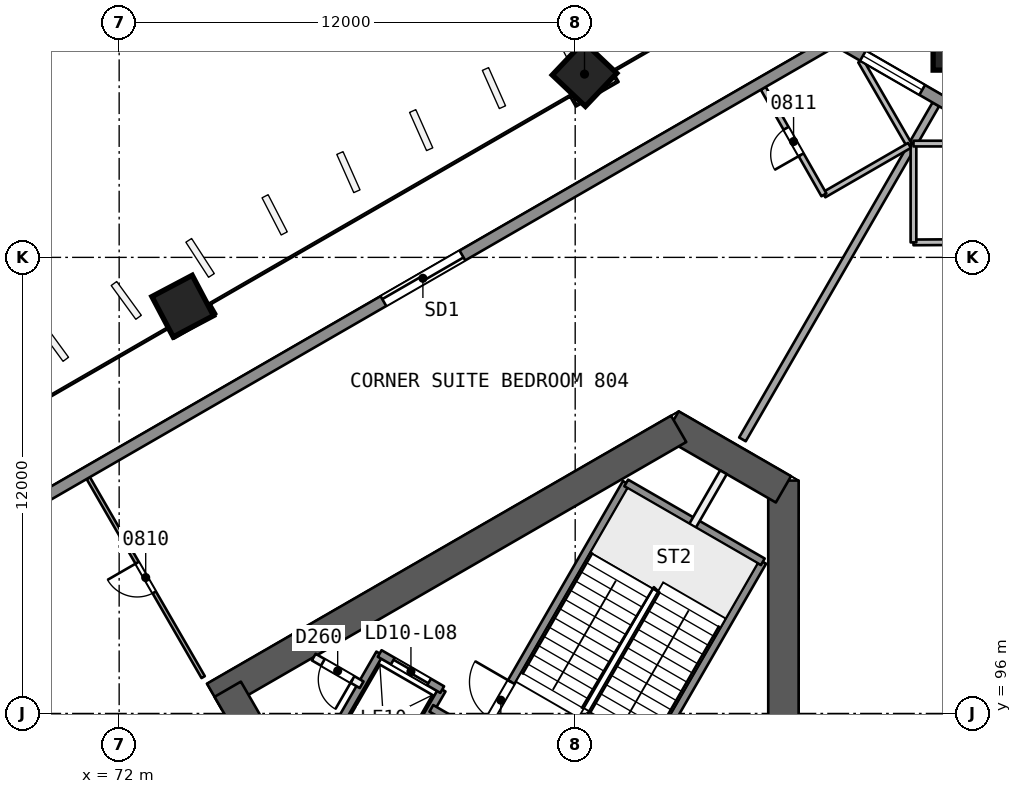
"""IFC4 building model, lengths in metres.
Left out: names, types, materials, properties, quantities, classifications, styles, units other than length and angle.
Written with IfcOpenShell. Run it as: python <this file> out.ifc"""

import sys

from ifc_helpers import new_model, si_unit, direction, frame, frame_2d, origin, origin_2d, place, context, subcontext, project, spatial, rectangle, extrude, element, fill, save


model = new_model("IFC4")
c1 = context("Model", 3, precision=1e-05, world=origin(), true_north=direction((0.0, 1.0)))
c2 = subcontext(c1, "Body", "Model", "MODEL_VIEW")
j1 = project(units=[si_unit("LENGTHUNIT", "METRE"), si_unit("PLANEANGLEUNIT", "RADIAN")], contexts=[c1])
p1 = place(None, origin())
s1 = spatial("IfcSite", under=j1, at=p1, CompositionType="ELEMENT")
p2 = place(p1, origin())
s2 = spatial("IfcBuilding", under=s1, at=p2, CompositionType="ELEMENT")
p3 = place(p2, frame((0.0, 0.0, 41.1)))
s3 = spatial("IfcBuildingStorey", under=s2, at=p3, CompositionType="ELEMENT", Elevation=41.1)
p4 = place(p3, frame((89.48, 88.194, 0.0), z_axis=(0.0, 0.0, 1.0), x_axis=(0.0, 1.0, 0.0)))
e1 = element("IfcWall", 1, at=p4, inside=s3, PredefinedType="SHEAR", context=c2, shape_type="SweptSolid", body=[
    extrude(rectangle(XDim=13.933, YDim=0.8, at=frame_2d((6.967, 0.0))), origin(), (0.0, 0.0, 1.0), 3.7),
])
p5 = place(p3, frame((89.48, 101.897, 0.0), z_axis=(0.0, 0.0, 1.0), x_axis=(-0.866034355626, 0.499984494636, 0.0)))
e2 = element("IfcWall", 2, at=p5, inside=s3, PredefinedType="SHEAR", context=c2, shape_type="SweptSolid", body=[
    extrude(rectangle(XDim=3.414, YDim=0.8, at=frame_2d((1.707, 0.0))), origin(), (0.0, 0.0, 1.0), 3.7),
])
p6 = place(p3, frame((86.723, 103.488, 0.0), z_axis=(0.0, 0.0, 1.0), x_axis=(-0.866032504327, -0.499987701298, 0.0)))
e3 = element("IfcWall", 3, at=p6, inside=s3, PredefinedType="SHEAR", context=c2, shape_type="SweptSolid", body=[
    extrude(rectangle(XDim=14.102, YDim=0.8, at=frame_2d((7.051, 0.0))), origin(), (0.0, 0.0, 1.0), 3.7),
])
p7 = place(p3, frame((74.856, 96.637, 0.0), z_axis=(0.0, 0.0, 1.0), x_axis=(0.499993500917, -0.866029155999, 0.0)))
e4 = element("IfcWall", 4, at=p7, inside=s3, PredefinedType="SHEAR", context=c2, shape_type="SweptSolid", body=[
    extrude(rectangle(XDim=9.98, YDim=0.8, at=frame_2d((4.99, 0.0))), origin(), (0.0, 0.0, 1.0), 3.7),
])
p8 = place(p7, frame((7.83, 0.0, 0.0)))
e5 = element("IfcOpeningElement", 5, at=p8, cuts=e4, PredefinedType="OPENING", context=c2, shape_type="SweptSolid", body=[
    extrude(rectangle(XDim=1.2, YDim=2.1, at=frame_2d((0.6, 1.05))), frame((0.0, 0.411, 0.0), z_axis=(0.0, -1.0, 0.0), x_axis=(1.0, 0.0, 0.0)), (0.0, 0.0, 1.0), 0.821),
])
p9 = place(p3, frame((94.84, 114.364, 0.0), z_axis=(-0.017607037296, -0.030466109479, 0.999380712447), x_axis=(0.86581098392, -0.500371202332, 2.457e-09)))
e6 = element("IfcColumn", 6, at=p9, inside=s3, PredefinedType="COLUMN", context=c2, shape_type="SweptSolid", body=[
    extrude(rectangle(XDim=2.8, YDim=2.8, at=origin_2d()), origin(), (0.0, 0.0, 1.0), 3.702),
])
p10 = place(p3, frame((84.256, 112.855, 0.0), z_axis=(-0.00837646992, -0.028097450282, 0.999570091609), x_axis=(0.86617163682, 0.499292783589, 0.021293469065)))
e7 = element("IfcColumn", 7, at=p10, inside=s3, PredefinedType="COLUMN", context=c2, shape_type="SweptSolid", body=[
    extrude(rectangle(XDim=1.2, YDim=1.2, at=origin_2d()), origin(), (0.0, 0.0, 1.0), 3.702),
])
p11 = place(p3, frame((73.671, 106.745, 0.0), z_axis=(0.000857578916, -0.022824792675, 0.999739112668), x_axis=(0.866060219769, 0.499825848733, 0.01066848966)))
e8 = element("IfcColumn", 8, at=p11, inside=s3, PredefinedType="COLUMN", context=c2, shape_type="SweptSolid", body=[
    extrude(rectangle(XDim=1.2, YDim=1.2, at=origin_2d()), origin(), (0.0, 0.0, 1.0), 3.701),
])
p12 = place(p3, frame((96.127, 108.413, 0.0), z_axis=(0.0, 0.0, 1.0), x_axis=(-0.999982570839, -0.005904067862, 0.0)))
e9 = element("IfcWall", 9, at=p12, inside=s3, PredefinedType="PARTITIONING", context=c2, shape_type="SweptSolid", body=[
    extrude(rectangle(XDim=3.225, YDim=0.15, at=frame_2d((1.613, 0.0))), origin(), (0.0, 0.0, 1.0), 3.2),
])
p13 = place(p12, frame((1.213, 0.0, 0.0)))
e10 = element("IfcOpeningElement", 10, at=p13, cuts=e9, PredefinedType="OPENING", context=c2, shape_type="SweptSolid", body=[
    extrude(rectangle(XDim=0.8, YDim=2.1, at=frame_2d((0.4, 1.05))), frame((0.0, 0.085, 0.0), z_axis=(0.0, -1.0, 0.0), x_axis=(1.0, 0.0, 0.0)), (0.0, 0.0, 1.0), 0.171),
])
p14 = place(p3, frame((92.902, 108.394, 0.0), z_axis=(0.0, 0.0, 1.0), x_axis=(0.0, 1.0, 0.0)))
e11 = element("IfcWall", 11, at=p14, inside=s3, PredefinedType="PARTITIONING", context=c2, shape_type="SweptSolid", body=[
    extrude(rectangle(XDim=2.6, YDim=0.15, at=frame_2d((1.3, 0.0))), origin(), (0.0, 0.0, 1.0), 3.2),
])
p15 = place(p3, frame((92.902, 110.994, 0.0), z_axis=(0.0, 0.0, 1.0), x_axis=(1.0, 0.0, 0.0)))
e12 = element("IfcWall", 12, at=p15, inside=s3, PredefinedType="PARTITIONING", context=c2, shape_type="SweptSolid", body=[
    extrude(rectangle(XDim=2.376, YDim=0.15, at=frame_2d((1.188, 0.0))), origin(), (0.0, 0.0, 1.0), 3.2),
])
p16 = place(p3, frame((93.49, 112.026, 0.0), z_axis=(0.0, 0.0, 1.0), x_axis=(-0.499993053251, -0.866029414455, 0.0)))
e13 = element("IfcWall", 13, at=p16, inside=s3, PredefinedType="PARTITIONING", context=c2, shape_type="SweptSolid", body=[
    extrude(rectangle(XDim=10.179, YDim=0.2, at=frame_2d((5.089, 0.0))), origin(), (0.0, 0.0, 1.0), 3.2),
])
p17 = place(p3, frame((74.21, 96.956, 0.0), z_axis=(0.0, 0.0, 1.0), x_axis=(-0.499985689571, 0.866033665757, 0.0)))
e14 = element("IfcWall", 14, at=p17, inside=s3, PredefinedType="PARTITIONING", context=c2, shape_type="SweptSolid", body=[
    extrude(rectangle(XDim=6.048, YDim=0.1, at=frame_2d((3.024, 0.0))), origin(), (0.0, 0.0, 1.0), 3.2),
])
p18 = place(p17, frame((2.574, 0.0, 0.0)))
e15 = element("IfcOpeningElement", 15, at=p18, cuts=e14, PredefinedType="OPENING", context=c2, shape_type="SweptSolid", body=[
    extrude(rectangle(XDim=0.9, YDim=2.1, at=frame_2d((0.45, 1.05))), frame((0.0, 0.061, 0.0), z_axis=(0.0, -1.0, 0.0), x_axis=(1.0, 0.0, 0.0)), (0.0, 0.0, 1.0), 0.121),
])
p19 = place(p3, frame((67.136, 99.855, 0.0), z_axis=(0.0, 0.0, 1.0), x_axis=(0.499997162821, -0.866027041824, 0.0)))
e16 = element("IfcWall", 16, at=p19, inside=s3, PredefinedType="PARTITIONING", context=c2, shape_type="SweptSolid", body=[
    extrude(rectangle(XDim=14.027, YDim=0.2, at=frame_2d((7.013, 0.0))), origin(), (0.0, 0.0, 1.0), 3.2),
])
p20 = place(p3, frame((91.514, 113.167, 0.0), z_axis=(0.0, 0.0, 1.0), x_axis=(0.499936653632, -0.866061973738, 0.0)))
e17 = element("IfcWall", 17, at=p20, inside=s3, PredefinedType="PARTITIONING", context=c2, shape_type="SweptSolid", body=[
    extrude(rectangle(XDim=2.565, YDim=0.15, at=frame_2d((1.283, 0.0))), origin(), (0.0, 0.0, 1.0), 3.2),
])
p21 = place(p3, frame((92.797, 110.946, 0.0), z_axis=(0.0, 0.0, 1.0), x_axis=(-0.866021400173, -0.500006934395, 0.0)))
e18 = element("IfcWall", 18, at=p21, inside=s3, PredefinedType="PARTITIONING", context=c2, shape_type="SweptSolid", body=[
    extrude(rectangle(XDim=2.6, YDim=0.15, at=frame_2d((1.3, 0.0))), origin(), (0.0, 0.0, 1.0), 3.2),
])
p22 = place(p3, frame((90.545, 109.646, 0.0), z_axis=(0.0, 0.0, 1.0), x_axis=(-0.494883074799, 0.868959574593, 0.0)))
e19 = element("IfcWall", 19, at=p22, inside=s3, PredefinedType="PARTITIONING", context=c2, shape_type="SweptSolid", body=[
    extrude(rectangle(XDim=3.225, YDim=0.15, at=frame_2d((1.613, 0.0))), origin(), (0.0, 0.0, 1.0), 3.2),
])
p23 = place(p22, frame((1.213, 0.0, 0.0)))
e20 = element("IfcOpeningElement", 20, at=p23, cuts=e19, PredefinedType="OPENING", context=c2, shape_type="SweptSolid", body=[
    extrude(rectangle(XDim=0.8, YDim=2.1, at=frame_2d((0.4, 1.05))), frame((0.0, 0.085, 0.0), z_axis=(0.0, -1.0, 0.0), x_axis=(1.0, 0.0, 0.0)), (0.0, 0.0, 1.0), 0.171),
])
p24 = place(p3, frame((90.854, 113.72, 0.0), z_axis=(0.0, 0.0, 1.0), x_axis=(0.866021938441, -0.500006002103, 0.0)))
e21 = element("IfcWall", 21, at=p24, inside=s3, PredefinedType="SOLIDWALL", context=c2, shape_type="SweptSolid", body=[
    extrude(rectangle(XDim=6.261, YDim=0.3, at=frame_2d((3.13, 0.0))), origin(), (0.0, 0.0, 1.0), 3.2),
])
p25 = place(p24, frame((3.522, 0.0, 0.9)))
e22 = element("IfcOpeningElement", 22, at=p25, cuts=e21, PredefinedType="OPENING", context=c2, shape_type="SweptSolid", body=[
    extrude(rectangle(XDim=1.8, YDim=1.5, at=frame_2d((0.9, 0.75))), frame((0.0, 0.161, 0.0), z_axis=(0.0, -1.0, 0.0), x_axis=(1.0, 0.0, 0.0)), (0.0, 0.0, 1.0), 0.321),
])
p26 = place(p24, frame((0.83, 0.0, 0.9)))
e23 = element("IfcOpeningElement", 23, at=p26, cuts=e21, PredefinedType="OPENING", context=c2, shape_type="SweptSolid", body=[
    extrude(rectangle(XDim=1.8, YDim=1.5, at=frame_2d((0.9, 0.75))), frame((0.0, 0.161, 0.0), z_axis=(0.0, -1.0, 0.0), x_axis=(1.0, 0.0, 0.0)), (0.0, 0.0, 1.0), 0.321),
])
p27 = place(p3, frame((37.87, 83.13, 0.0), z_axis=(0.0, 0.0, 1.0), x_axis=(0.866026630825, 0.499997874697, 0.0)))
e24 = element("IfcWall", 24, at=p27, inside=s3, PredefinedType="SOLIDWALL", context=c2, shape_type="SweptSolid", body=[
    extrude(rectangle(XDim=61.18, YDim=0.3, at=frame_2d((30.59, 0.0))), origin(), (0.0, 0.0, 1.0), 3.2),
])
p28 = place(p27, frame((12.181, 0.0, 0.0)))
e25 = element("IfcOpeningElement", 25, at=p28, cuts=e24, PredefinedType="OPENING", context=c2, shape_type="SweptSolid", body=[
    extrude(rectangle(XDim=2.4, YDim=2.4, at=frame_2d((1.2, 1.2))), frame((0.0, 0.161, 0.0), z_axis=(0.0, -1.0, 0.0), x_axis=(1.0, 0.0, 0.0)), (0.0, 0.0, 1.0), 0.321),
])
p29 = place(p27, frame((34.846, 0.0, 0.0)))
e26 = element("IfcOpeningElement", 26, at=p29, cuts=e24, PredefinedType="OPENING", context=c2, shape_type="SweptSolid", body=[
    extrude(rectangle(XDim=2.4, YDim=2.4, at=frame_2d((1.2, 1.2))), frame((0.0, 0.161, 0.0), z_axis=(0.0, -1.0, 0.0), x_axis=(1.0, 0.0, 0.0)), (0.0, 0.0, 1.0), 0.321),
])
p30 = place(p27, frame((47.439, 0.0, 0.0)))
e27 = element("IfcOpeningElement", 27, at=p30, cuts=e24, PredefinedType="OPENING", context=c2, shape_type="SweptSolid", body=[
    extrude(rectangle(XDim=2.4, YDim=2.4, at=frame_2d((1.2, 1.2))), frame((0.0, 0.161, 0.0), z_axis=(0.0, -1.0, 0.0), x_axis=(1.0, 0.0, 0.0)), (0.0, 0.0, 1.0), 0.321),
])
p31 = place(p27, frame((29.078, 0.0, 0.0)))
e28 = element("IfcOpeningElement", 28, at=p31, cuts=e24, PredefinedType="OPENING", context=c2, shape_type="SweptSolid", body=[
    extrude(rectangle(XDim=2.4, YDim=2.4, at=frame_2d((1.2, 1.2))), frame((0.0, 0.161, 0.0), z_axis=(0.0, -1.0, 0.0), x_axis=(1.0, 0.0, 0.0)), (0.0, 0.0, 1.0), 0.321),
])
p32 = place(p3, frame((85.087, 93.321, 0.0), z_axis=(0.0, 0.0, 1.0), x_axis=(0.500019787375, 0.866013979237, 0.0)))
e29 = element("IfcWall", 29, at=p32, inside=s3, PredefinedType="SOLIDWALL", context=c2, shape_type="SweptSolid", body=[
    extrude(rectangle(XDim=7.7, YDim=0.2, at=frame_2d((3.85, 0.0))), origin(), (0.0, 0.0, 1.0), 3.2),
])
p33 = place(p3, frame((87.09, 100.94, 0.0), z_axis=(0.0, 0.0, 1.0), x_axis=(0.499956811548, 0.866050337213, 0.0)))
e30 = element("IfcWall", 30, at=p33, inside=s3, PredefinedType="PARTITIONING", context=c2, shape_type="SweptSolid", body=[
    extrude(rectangle(XDim=1.623, YDim=0.2, at=frame_2d((0.812, 0.0))), origin(), (0.0, 0.0, 1.0), 3.2),
])
p34 = place(p3, frame((81.493, 95.396, 0.0), z_axis=(0.0, 0.0, 1.0), x_axis=(0.500006057782, 0.866021906294, 0.0)))
e31 = element("IfcWall", 31, at=p34, inside=s3, PredefinedType="SOLIDWALL", context=c2, shape_type="SweptSolid", body=[
    extrude(rectangle(XDim=7.7, YDim=0.2, at=frame_2d((3.85, 0.0))), origin(), (0.0, 0.0, 1.0), 3.2),
])
p35 = place(p34, frame((0.55, 0.0, 0.0)))
e32 = element("IfcOpeningElement", 32, at=p35, cuts=e31, PredefinedType="OPENING", context=c2, shape_type="SweptSolid", body=[
    extrude(rectangle(XDim=1.1, YDim=2.1, at=frame_2d((0.55, 1.05))), frame((0.0, 0.11, 0.0), z_axis=(0.0, -1.0, 0.0), x_axis=(1.0, 0.0, 0.0)), (0.0, 0.0, 1.0), 0.221),
])
for number, where, z_axis, x_axis in (
    (33, (78.976, 93.986, 0.0), (0.0, 0.0, 1.0), (0.5, 0.866, 0.0)),
    (34, (77.33, 94.936, 0.0), (0.0, 0.0, 1.0), (0.5, 0.866, 0.0)),
):
    element("IfcWall", number, at=place(p3, frame(where, z_axis=z_axis, x_axis=x_axis)), inside=s3, PredefinedType="SOLIDWALL", context=c2, shape_type="SweptSolid", body=[
        extrude(rectangle(XDim=3.05, YDim=0.2, at=frame_2d((1.525, 0.0))), origin(), (0.0, 0.0, 1.0), 3.2),
    ])
p36 = place(p3, frame((78.38, 96.755, 0.0), z_axis=(0.0, 0.0, 1.0), x_axis=(-0.866003949776, 0.500037157592, 0.0)))
e35 = element("IfcWall", 35, at=p36, inside=s3, PredefinedType="PARTITIONING", context=c2, shape_type="SweptSolid", body=[
    extrude(rectangle(XDim=1.455, YDim=0.2, at=frame_2d((0.728, 0.0))), origin(), (0.0, 0.0, 1.0), 3.2),
])
p37 = place(p36, frame((0.278, 0.0, 0.0)))
e36 = element("IfcOpeningElement", 36, at=p37, cuts=e35, PredefinedType="OPENING", context=c2, shape_type="SweptSolid", body=[
    extrude(rectangle(XDim=0.9, YDim=2.1, at=frame_2d((0.45, 1.05))), frame((0.0, 0.11, 0.0), z_axis=(0.0, -1.0, 0.0), x_axis=(1.0, 0.0, 0.0)), (0.0, 0.0, 1.0), 0.221),
])
p38 = place(p3, frame((88.01, 91.634, 0.0), z_axis=(0.0, 0.0, 1.0), x_axis=(-0.866024315419, 0.5000018851, 0.0)))
e37 = element("IfcWall", 37, at=p38, inside=s3, PredefinedType="SOLIDWALL", context=c2, shape_type="SweptSolid", body=[
    extrude(rectangle(XDim=9.0, YDim=0.2, at=frame_2d((4.5, 0.0))), origin(), (0.0, 0.0, 1.0), 3.2),
])
p39 = place(p3, frame((80.5, 96.627, 0.0), z_axis=(0.0, 0.0, 1.0), x_axis=(-0.86601224135, 0.500022797313, 0.0)))
e38 = element("IfcWall", 38, at=p39, inside=s3, PredefinedType="SOLIDWALL", context=c2, shape_type="SweptSolid", body=[
    extrude(rectangle(XDim=1.9, YDim=0.2, at=frame_2d((0.95, 0.0))), origin(), (0.0, 0.0, 1.0), 3.2),
])
p40 = place(p39, frame((0.4, 0.0, 0.0)))
e39 = element("IfcOpeningElement", 39, at=p40, cuts=e38, PredefinedType="OPENING", context=c2, shape_type="SweptSolid", body=[
    extrude(rectangle(XDim=1.1, YDim=2.1, at=frame_2d((0.55, 1.05))), frame((0.0, 0.11, 0.0), z_axis=(0.0, -1.0, 0.0), x_axis=(1.0, 0.0, 0.0)), (0.0, 0.0, 1.0), 0.221),
])
p41 = place(p3, frame((88.937, 99.99, 0.0), z_axis=(0.0, 0.0, 1.0), x_axis=(-0.866004344652, 0.500036473714, 0.0)))
e40 = element("IfcWall", 40, at=p41, inside=s3, PredefinedType="SOLIDWALL", context=c2, shape_type="SweptSolid", body=[
    extrude(rectangle(XDim=4.15, YDim=0.2, at=frame_2d((2.075, 0.0))), origin(), (0.0, 0.0, 1.0), 3.2),
])
p42 = place(p18, origin())
e41 = element("IfcDoor", 41, at=p42, inside=s3, OperationType="SINGLE_SWING_RIGHT", PredefinedType="NOTDEFINED", context=c2, shape_type="SweptSolid", body=[
    extrude(rectangle(XDim=0.9, YDim=2.1, at=frame_2d((0.45, 1.05))), frame((0.0, 0.025, 0.0), z_axis=(0.0, -1.0, 0.0), x_axis=(1.0, 0.0, 0.0)), (0.0, 0.0, 1.0), 0.05),
])
fill(e15, e41)
p43 = place(p23, origin())
e42 = element("IfcDoor", 42, at=p43, inside=s3, OperationType="SINGLE_SWING_LEFT", PredefinedType="NOTDEFINED", context=c2, shape_type="SweptSolid", body=[
    extrude(rectangle(XDim=0.8, YDim=2.1, at=frame_2d((0.4, 1.05))), frame((0.0, 0.025, 0.0), z_axis=(0.0, -1.0, 0.0), x_axis=(1.0, 0.0, 0.0)), (0.0, 0.0, 1.0), 0.05),
])
fill(e20, e42)
p44 = place(p26, origin())
e43 = element("IfcWindow", 43, at=p44, inside=s3, PartitioningType="SINGLE_PANEL", PredefinedType="WINDOW", context=c2, shape_type="SweptSolid", body=[
    extrude(rectangle(XDim=1.8, YDim=1.5, at=frame_2d((0.9, 0.75))), frame((0.0, 0.03, 0.0), z_axis=(0.0, -1.0, 0.0), x_axis=(1.0, 0.0, 0.0)), (0.0, 0.0, 1.0), 0.06),
])
fill(e23, e43)
p45 = place(p30, origin())
e44 = element("IfcDoor", 44, at=p45, inside=s3, OperationType="SLIDING_TO_LEFT", PredefinedType="NOTDEFINED", context=c2, shape_type="SweptSolid", body=[
    extrude(rectangle(XDim=2.4, YDim=2.4, at=frame_2d((1.2, 1.2))), frame((0.0, 0.025, 0.0), z_axis=(0.0, -1.0, 0.0), x_axis=(1.0, 0.0, 0.0)), (0.0, 0.0, 1.0), 0.05),
])
fill(e27, e44)
p46 = place(p40, origin())
e45 = element("IfcDoor", 45, at=p46, inside=s3, OperationType="SLIDING_TO_RIGHT", PredefinedType="NOTDEFINED", context=c2, shape_type="SweptSolid", body=[
    extrude(rectangle(XDim=1.1, YDim=2.1, at=frame_2d((0.55, 1.05))), frame((0.0, 0.025, 0.0), z_axis=(0.0, -1.0, 0.0), x_axis=(1.0, 0.0, 0.0)), (0.0, 0.0, 1.0), 0.05),
])
fill(e39, e45)
p47 = place(p37, origin())
e46 = element("IfcDoor", 46, at=p47, inside=s3, OperationType="SINGLE_SWING_LEFT", PredefinedType="NOTDEFINED", context=c2, shape_type="SweptSolid", body=[
    extrude(rectangle(XDim=0.9, YDim=2.1, at=frame_2d((0.45, 1.05))), frame((0.0, 0.025, 0.0), z_axis=(0.0, -1.0, 0.0), x_axis=(1.0, 0.0, 0.0)), (0.0, 0.0, 1.0), 0.05),
])
fill(e36, e46)
p48 = place(p35, origin())
e47 = element("IfcDoor", 47, at=p48, inside=s3, OperationType="SINGLE_SWING_RIGHT", PredefinedType="NOTDEFINED", context=c2, shape_type="SweptSolid", body=[
    extrude(rectangle(XDim=1.1, YDim=2.1, at=frame_2d((0.55, 1.05))), frame((0.0, 0.025, 0.0), z_axis=(0.0, -1.0, 0.0), x_axis=(1.0, 0.0, 0.0)), (0.0, 0.0, 1.0), 0.05),
])
fill(e32, e47)
save(model, sys.argv[1])
